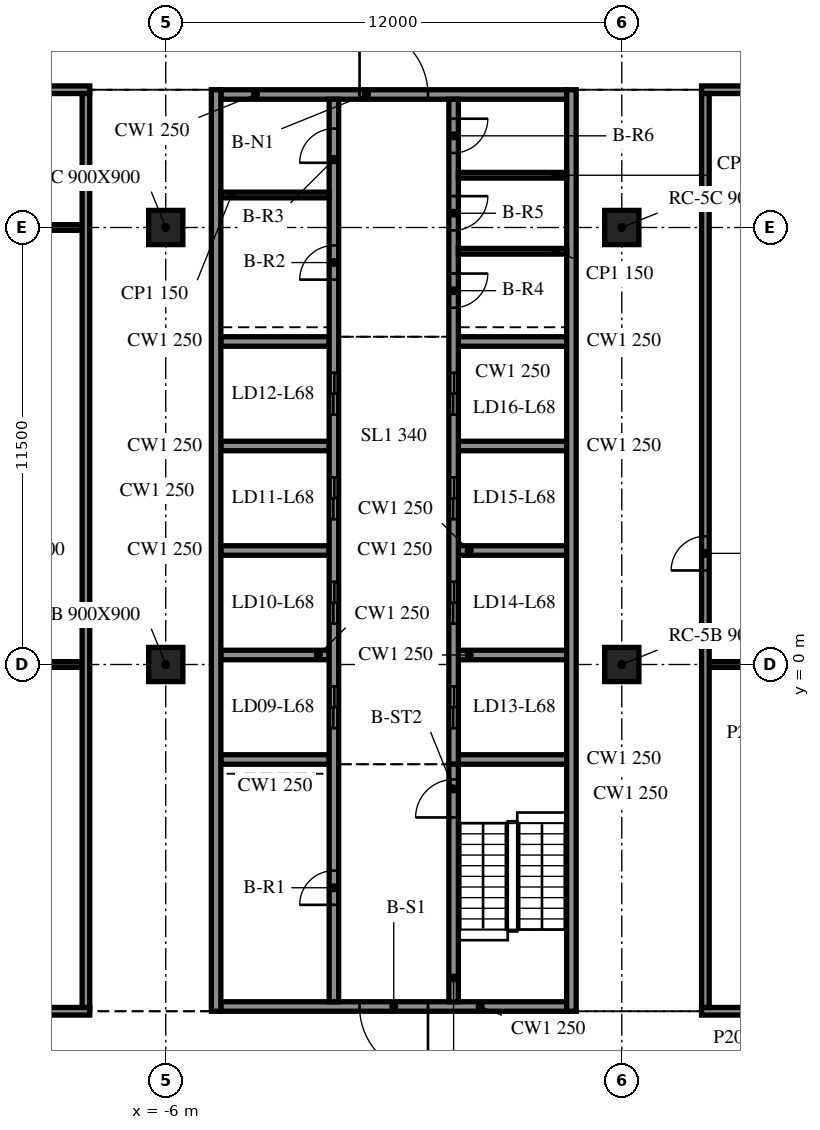
"""IFC4 building model, lengths in metres.
Left out: names, types, materials, properties, quantities, classifications, styles, units other than length and angle.
Written with IfcOpenShell. Run it as: python <this file> out.ifc"""

import sys

from ifc_helpers import new_model, si_unit, direction, frame, frame_2d, origin, origin_2d, place, context, subcontext, project, spatial, rectangle, extrude, element, fill, save


model = new_model("IFC4")
c1 = context("Model", 3, precision=1e-05, world=origin(), true_north=direction((0.0, 1.0)))
c2 = subcontext(c1, "Body", "Model", "MODEL_VIEW")
j1 = project(units=[si_unit("LENGTHUNIT", "METRE"), si_unit("PLANEANGLEUNIT", "RADIAN")], contexts=[c1])
p1 = place(None, origin())
s1 = spatial("IfcSite", under=j1, at=p1, CompositionType="ELEMENT")
p2 = place(p1, origin())
s2 = spatial("IfcBuilding", under=s1, at=p2, CompositionType="ELEMENT")
p3 = place(p2, frame((0.0, 0.0, 278.5)))
s3 = spatial("IfcBuildingStorey", under=s2, at=p3, CompositionType="ELEMENT", Elevation=278.5)
for number, where, z_axis, x_axis in (
    (1, (-6.0, 0.0, -0.34), (0.0, 0.0, 1.0), (1.0, 0.0, 0.0)),
    (2, (-6.0, 11.5, -0.34), (0.0, 0.0, 1.0), (1.0, 0.0, 0.0)),
    (3, (6.0, 0.0, -0.34), (0.0, 0.0, 1.0), (1.0, 0.0, 0.0)),
    (4, (6.0, 11.5, -0.34), (0.0, 0.0, 1.0), (1.0, 0.0, 0.0)),
):
    element("IfcColumn", number, at=place(p3, frame(where, z_axis=z_axis, x_axis=x_axis)), inside=s3, PredefinedType="COLUMN", context=c2, shape_type="SweptSolid", body=[
        extrude(rectangle(XDim=0.9, YDim=0.9, at=origin_2d()), origin(), (0.0, 0.0, 1.0), 3.8),
    ])
for number, where, z_axis, x_axis in (
    (5, (-4.675, 15.125, 0.0), (0.0, 0.0, 1.0), (0.0, -1.0, 0.0)),
    (6, (4.675, -9.125, 0.0), (0.0, 0.0, 1.0), (0.0, 1.0, 0.0)),
):
    element("IfcWall", number, at=place(p3, frame(where, z_axis=z_axis, x_axis=x_axis)), inside=s3, PredefinedType="SOLIDWALL", context=c2, shape_type="SweptSolid", body=[
        extrude(rectangle(XDim=24.25, YDim=0.25, at=frame_2d((12.125, 0.0))), origin(), (0.0, 0.0, 1.0), 3.46),
    ])
p4 = place(p3, frame((4.55, -9.0, 0.0), z_axis=(0.0, 0.0, 1.0), x_axis=(-1.0, 0.0, 0.0)))
e7 = element("IfcWall", 7, at=p4, inside=s3, PredefinedType="SOLIDWALL", context=c2, shape_type="SweptSolid", body=[
    extrude(rectangle(XDim=9.1, YDim=0.25, at=frame_2d((4.55, 0.0))), origin(), (0.0, 0.0, 1.0), 3.46),
])
p5 = place(p4, frame((3.65, 0.0, 0.0)))
e8 = element("IfcOpeningElement", 8, at=p5, cuts=e7, PredefinedType="OPENING", context=c2, shape_type="SweptSolid", body=[
    extrude(rectangle(XDim=1.8, YDim=2.1, at=frame_2d((0.9, 1.05))), frame((0.0, 0.135, 0.0), z_axis=(0.0, -1.0, 0.0), x_axis=(1.0, 0.0, 0.0)), (0.0, 0.0, 1.0), 0.27),
])
p6 = place(p3, frame((-4.55, 15.0, 0.0), z_axis=(0.0, 0.0, 1.0), x_axis=(1.0, 0.0, 0.0)))
e9 = element("IfcWall", 9, at=p6, inside=s3, PredefinedType="SOLIDWALL", context=c2, shape_type="SweptSolid", body=[
    extrude(rectangle(XDim=9.1, YDim=0.25, at=frame_2d((4.55, 0.0))), origin(), (0.0, 0.0, 1.0), 3.46),
])
p7 = place(p6, frame((3.65, 0.0, 0.0)))
e10 = element("IfcOpeningElement", 10, at=p7, cuts=e9, PredefinedType="OPENING", context=c2, shape_type="SweptSolid", body=[
    extrude(rectangle(XDim=1.8, YDim=2.1, at=frame_2d((0.9, 1.05))), frame((0.0, 0.135, 0.0), z_axis=(0.0, -1.0, 0.0), x_axis=(1.0, 0.0, 0.0)), (0.0, 0.0, 1.0), 0.27),
])
p8 = place(p3, frame((-1.575, -8.875, 0.0), z_axis=(0.0, 0.0, 1.0), x_axis=(0.0, 1.0, 0.0)))
e11 = element("IfcWall", 11, at=p8, inside=s3, PredefinedType="SOLIDWALL", context=c2, shape_type="SweptSolid", body=[
    extrude(rectangle(XDim=23.75, YDim=0.25, at=frame_2d((11.875, 0.0))), origin(), (0.0, 0.0, 1.0), 3.46),
])
p9 = place(p8, frame((7.2, 0.0, 0.0)))
e12 = element("IfcOpeningElement", 12, at=p9, cuts=e11, PredefinedType="OPENING", context=c2, shape_type="SweptSolid", body=[
    extrude(rectangle(XDim=1.1, YDim=2.1, at=frame_2d((0.55, 1.05))), frame((0.0, 0.135, 0.0), z_axis=(0.0, -1.0, 0.0), x_axis=(1.0, 0.0, 0.0)), (0.0, 0.0, 1.0), 0.27),
])
p10 = place(p8, frame((9.95, 0.0, 0.0)))
e13 = element("IfcOpeningElement", 13, at=p10, cuts=e11, PredefinedType="OPENING", context=c2, shape_type="SweptSolid", body=[
    extrude(rectangle(XDim=1.1, YDim=2.1, at=frame_2d((0.55, 1.05))), frame((0.0, 0.135, 0.0), z_axis=(0.0, -1.0, 0.0), x_axis=(1.0, 0.0, 0.0)), (0.0, 0.0, 1.0), 0.27),
])
p11 = place(p8, frame((12.7, 0.0, 0.0)))
e14 = element("IfcOpeningElement", 14, at=p11, cuts=e11, PredefinedType="OPENING", context=c2, shape_type="SweptSolid", body=[
    extrude(rectangle(XDim=1.1, YDim=2.1, at=frame_2d((0.55, 1.05))), frame((0.0, 0.135, 0.0), z_axis=(0.0, -1.0, 0.0), x_axis=(1.0, 0.0, 0.0)), (0.0, 0.0, 1.0), 0.27),
])
p12 = place(p8, frame((15.45, 0.0, 0.0)))
e15 = element("IfcOpeningElement", 15, at=p12, cuts=e11, PredefinedType="OPENING", context=c2, shape_type="SweptSolid", body=[
    extrude(rectangle(XDim=1.1, YDim=2.1, at=frame_2d((0.55, 1.05))), frame((0.0, 0.135, 0.0), z_axis=(0.0, -1.0, 0.0), x_axis=(1.0, 0.0, 0.0)), (0.0, 0.0, 1.0), 0.27),
])
p13 = place(p8, frame((2.55, 0.0, 0.0)))
e16 = element("IfcOpeningElement", 16, at=p13, cuts=e11, PredefinedType="OPENING", context=c2, shape_type="SweptSolid", body=[
    extrude(rectangle(XDim=0.9, YDim=2.1, at=frame_2d((0.45, 1.05))), frame((0.0, 0.135, 0.0), z_axis=(0.0, -1.0, 0.0), x_axis=(1.0, 0.0, 0.0)), (0.0, 0.0, 1.0), 0.27),
])
p14 = place(p8, frame((19.002, 0.0, 0.0)))
e17 = element("IfcOpeningElement", 17, at=p14, cuts=e11, PredefinedType="OPENING", context=c2, shape_type="SweptSolid", body=[
    extrude(rectangle(XDim=0.9, YDim=2.1, at=frame_2d((0.45, 1.05))), frame((0.0, 0.135, 0.0), z_axis=(0.0, -1.0, 0.0), x_axis=(1.0, 0.0, 0.0)), (0.0, 0.0, 1.0), 0.27),
])
p15 = place(p8, frame((22.077, 0.0, 0.0)))
e18 = element("IfcOpeningElement", 18, at=p15, cuts=e11, PredefinedType="OPENING", context=c2, shape_type="SweptSolid", body=[
    extrude(rectangle(XDim=0.9, YDim=2.1, at=frame_2d((0.45, 1.05))), frame((0.0, 0.135, 0.0), z_axis=(0.0, -1.0, 0.0), x_axis=(1.0, 0.0, 0.0)), (0.0, 0.0, 1.0), 0.27),
])
p16 = place(p3, frame((1.575, -8.875, 0.0), z_axis=(0.0, 0.0, 1.0), x_axis=(0.0, 1.0, 0.0)))
e19 = element("IfcWall", 19, at=p16, inside=s3, PredefinedType="SOLIDWALL", context=c2, shape_type="SweptSolid", body=[
    extrude(rectangle(XDim=6.25, YDim=0.25, at=frame_2d((3.125, 0.0))), origin(), (0.0, 0.0, 1.0), 3.46),
])
p17 = place(p16, frame((4.85, 0.0, 0.0)))
e20 = element("IfcOpeningElement", 20, at=p17, cuts=e19, PredefinedType="OPENING", context=c2, shape_type="SweptSolid", body=[
    extrude(rectangle(XDim=1.0, YDim=2.1, at=frame_2d((0.5, 1.05))), frame((0.0, 0.135, 0.0), z_axis=(0.0, -1.0, 0.0), x_axis=(1.0, 0.0, 0.0)), (0.0, 0.0, 1.0), 0.27),
])
p18 = place(p3, frame((1.575, 14.875, 0.0), z_axis=(0.0, 0.0, 1.0), x_axis=(0.0, -1.0, 0.0)))
e21 = element("IfcWall", 21, at=p18, inside=s3, PredefinedType="SOLIDWALL", context=c2, shape_type="SweptSolid", body=[
    extrude(rectangle(XDim=17.5, YDim=0.25, at=frame_2d((8.75, 0.0))), origin(), (0.0, 0.0, 1.0), 3.46),
])
p19 = place(p18, frame((15.45, 0.0, 0.0)))
e22 = element("IfcOpeningElement", 22, at=p19, cuts=e21, PredefinedType="OPENING", context=c2, shape_type="SweptSolid", body=[
    extrude(rectangle(XDim=1.1, YDim=2.1, at=frame_2d((0.55, 1.05))), frame((0.0, 0.135, 0.0), z_axis=(0.0, -1.0, 0.0), x_axis=(1.0, 0.0, 0.0)), (0.0, 0.0, 1.0), 0.27),
])
p20 = place(p18, frame((12.7, 0.0, 0.0)))
e23 = element("IfcOpeningElement", 23, at=p20, cuts=e21, PredefinedType="OPENING", context=c2, shape_type="SweptSolid", body=[
    extrude(rectangle(XDim=1.1, YDim=2.1, at=frame_2d((0.55, 1.05))), frame((0.0, 0.135, 0.0), z_axis=(0.0, -1.0, 0.0), x_axis=(1.0, 0.0, 0.0)), (0.0, 0.0, 1.0), 0.27),
])
p21 = place(p18, frame((9.95, 0.0, 0.0)))
e24 = element("IfcOpeningElement", 24, at=p21, cuts=e21, PredefinedType="OPENING", context=c2, shape_type="SweptSolid", body=[
    extrude(rectangle(XDim=1.1, YDim=2.1, at=frame_2d((0.55, 1.05))), frame((0.0, 0.135, 0.0), z_axis=(0.0, -1.0, 0.0), x_axis=(1.0, 0.0, 0.0)), (0.0, 0.0, 1.0), 0.27),
])
p22 = place(p18, frame((7.2, 0.0, 0.0)))
e25 = element("IfcOpeningElement", 25, at=p22, cuts=e21, PredefinedType="OPENING", context=c2, shape_type="SweptSolid", body=[
    extrude(rectangle(XDim=1.1, YDim=2.1, at=frame_2d((0.55, 1.05))), frame((0.0, 0.135, 0.0), z_axis=(0.0, -1.0, 0.0), x_axis=(1.0, 0.0, 0.0)), (0.0, 0.0, 1.0), 0.27),
])
p23 = place(p18, frame((4.587, 0.0, 0.0)))
e26 = element("IfcOpeningElement", 26, at=p23, cuts=e21, PredefinedType="OPENING", context=c2, shape_type="SweptSolid", body=[
    extrude(rectangle(XDim=0.9, YDim=2.1, at=frame_2d((0.45, 1.05))), frame((0.0, 0.135, 0.0), z_axis=(0.0, -1.0, 0.0), x_axis=(1.0, 0.0, 0.0)), (0.0, 0.0, 1.0), 0.27),
])
p24 = place(p18, frame((2.55, 0.0, 0.0)))
e27 = element("IfcOpeningElement", 27, at=p24, cuts=e21, PredefinedType="OPENING", context=c2, shape_type="SweptSolid", body=[
    extrude(rectangle(XDim=0.9, YDim=2.1, at=frame_2d((0.45, 1.05))), frame((0.0, 0.135, 0.0), z_axis=(0.0, -1.0, 0.0), x_axis=(1.0, 0.0, 0.0)), (0.0, 0.0, 1.0), 0.27),
])
p25 = place(p18, frame((0.512, 0.0, 0.0)))
e28 = element("IfcOpeningElement", 28, at=p25, cuts=e21, PredefinedType="OPENING", context=c2, shape_type="SweptSolid", body=[
    extrude(rectangle(XDim=0.9, YDim=2.1, at=frame_2d((0.45, 1.05))), frame((0.0, 0.135, 0.0), z_axis=(0.0, -1.0, 0.0), x_axis=(1.0, 0.0, 0.0)), (0.0, 0.0, 1.0), 0.27),
])
for number, where, z_axis, x_axis in (
    (29, (-4.55, -2.5, 0.0), (0.0, 0.0, 1.0), (1.0, 0.0, 0.0)),
    (30, (-4.55, 0.25, 0.0), (0.0, 0.0, 1.0), (1.0, 0.0, 0.0)),
    (31, (-4.55, 3.0, 0.0), (0.0, 0.0, 1.0), (1.0, 0.0, 0.0)),
    (32, (-4.55, 5.75, 0.0), (0.0, 0.0, 1.0), (1.0, 0.0, 0.0)),
    (33, (-4.55, 8.5, 0.0), (0.0, 0.0, 1.0), (1.0, 0.0, 0.0)),
    (34, (1.7, -2.5, 0.0), (0.0, 0.0, 1.0), (1.0, 0.0, 0.0)),
    (35, (1.7, 0.25, 0.0), (0.0, 0.0, 1.0), (1.0, 0.0, 0.0)),
    (36, (1.7, 3.0, 0.0), (0.0, 0.0, 1.0), (1.0, 0.0, 0.0)),
    (37, (1.7, 5.75, 0.0), (0.0, 0.0, 1.0), (1.0, 0.0, 0.0)),
    (38, (1.7, 8.5, 0.0), (0.0, 0.0, 1.0), (1.0, 0.0, 0.0)),
):
    element("IfcWall", number, at=place(p3, frame(where, z_axis=z_axis, x_axis=x_axis)), inside=s3, PredefinedType="SOLIDWALL", context=c2, shape_type="SweptSolid", body=[
        extrude(rectangle(XDim=2.85, YDim=0.25, at=frame_2d((1.425, 0.0))), origin(), (0.0, 0.0, 1.0), 3.46),
    ])
for number, where, z_axis, x_axis in (
    (39, (-4.55, 12.355, 0.0), (0.0, 0.0, 1.0), (1.0, 0.0, 0.0)),
    (40, (1.7, 10.875, 0.0), (0.0, 0.0, 1.0), (1.0, 0.0, 0.0)),
    (41, (1.7, 12.875, 0.0), (0.0, 0.0, 1.0), (1.0, 0.0, 0.0)),
):
    element("IfcWall", number, at=place(p3, frame(where, z_axis=z_axis, x_axis=x_axis)), inside=s3, PredefinedType="PARTITIONING", context=c2, shape_type="SweptSolid", body=[
        extrude(rectangle(XDim=2.85, YDim=0.15, at=frame_2d((1.425, 0.0))), origin(), (0.0, 0.0, 1.0), 3.46),
    ])
p26 = place(p3, frame((-16.1, -9.125, 0.0), z_axis=(0.0, 0.0, 1.0), x_axis=(1.0, 0.0, 0.0)))
e42 = element("IfcWall", 42, at=p26, inside=s3, PredefinedType="PARTITIONING", context=c2, shape_type="SweptSolid", body=[
    extrude(rectangle(XDim=8.1, YDim=0.2, at=frame_2d((4.05, 0.0))), origin(), (0.0, 0.0, 1.0), 3.46),
])
p27 = place(p26, frame((3.5, 0.0, 0.0)))
e43 = element("IfcOpeningElement", 43, at=p27, cuts=e42, PredefinedType="OPENING", context=c2, shape_type="SweptSolid", body=[
    extrude(rectangle(XDim=0.9, YDim=2.1, at=frame_2d((0.45, 1.05))), frame((0.0, 0.11, 0.0), z_axis=(0.0, -1.0, 0.0), x_axis=(1.0, 0.0, 0.0)), (0.0, 0.0, 1.0), 0.22),
])
p28 = place(p3, frame((8.1, -9.125, 0.0), z_axis=(0.0, 0.0, 1.0), x_axis=(1.0, 0.0, 0.0)))
e44 = element("IfcWall", 44, at=p28, inside=s3, PredefinedType="PARTITIONING", context=c2, shape_type="SweptSolid", body=[
    extrude(rectangle(XDim=7.7, YDim=0.2, at=frame_2d((3.85, 0.0))), origin(), (0.0, 0.0, 1.0), 3.46),
])
p29 = place(p28, frame((3.3, 0.0, 0.0)))
e45 = element("IfcOpeningElement", 45, at=p29, cuts=e44, PredefinedType="OPENING", context=c2, shape_type="SweptSolid", body=[
    extrude(rectangle(XDim=0.9, YDim=2.1, at=frame_2d((0.45, 1.05))), frame((0.0, 0.11, 0.0), z_axis=(0.0, -1.0, 0.0), x_axis=(1.0, 0.0, 0.0)), (0.0, 0.0, 1.0), 0.22),
])
p30 = place(p3, frame((-15.9, 0.0, 0.0), z_axis=(0.0, 0.0, 1.0), x_axis=(1.0, 0.0, 0.0)))
e46 = element("IfcWall", 46, at=p30, inside=s3, PredefinedType="PARTITIONING", context=c2, shape_type="SweptSolid", body=[
    extrude(rectangle(XDim=7.7, YDim=0.15, at=frame_2d((3.85, 0.0))), origin(), (0.0, 0.0, 1.0), 3.46),
])
p31 = place(p3, frame((8.3, 0.0, 0.0), z_axis=(0.0, 0.0, 1.0), x_axis=(1.0, 0.0, 0.0)))
e47 = element("IfcWall", 47, at=p31, inside=s3, PredefinedType="PARTITIONING", context=c2, shape_type="SweptSolid", body=[
    extrude(rectangle(XDim=7.3, YDim=0.15, at=frame_2d((3.65, 0.0))), origin(), (0.0, 0.0, 1.0), 3.46),
])
p32 = place(p3, frame((-15.9, 11.5, 0.0), z_axis=(0.0, 0.0, 1.0), x_axis=(1.0, 0.0, 0.0)))
e48 = element("IfcWall", 48, at=p32, inside=s3, PredefinedType="PARTITIONING", context=c2, shape_type="SweptSolid", body=[
    extrude(rectangle(XDim=7.7, YDim=0.15, at=frame_2d((3.85, 0.0))), origin(), (0.0, 0.0, 1.0), 3.46),
])
p33 = place(p3, frame((-16.1, 15.125, 0.0), z_axis=(0.0, 0.0, 1.0), x_axis=(1.0, 0.0, 0.0)))
e49 = element("IfcWall", 49, at=p33, inside=s3, PredefinedType="PARTITIONING", context=c2, shape_type="SweptSolid", body=[
    extrude(rectangle(XDim=8.1, YDim=0.2, at=frame_2d((4.05, 0.0))), origin(), (0.0, 0.0, 1.0), 3.46),
])
p34 = place(p33, frame((3.5, 0.0, 0.0)))
e50 = element("IfcOpeningElement", 50, at=p34, cuts=e49, PredefinedType="OPENING", context=c2, shape_type="SweptSolid", body=[
    extrude(rectangle(XDim=1.0, YDim=2.1, at=frame_2d((0.5, 1.05))), frame((0.0, 0.11, 0.0), z_axis=(0.0, -1.0, 0.0), x_axis=(1.0, 0.0, 0.0)), (0.0, 0.0, 1.0), 0.22),
])
p35 = place(p3, frame((8.1, 15.125, 0.0), z_axis=(0.0, 0.0, 1.0), x_axis=(1.0, 0.0, 0.0)))
e51 = element("IfcWall", 51, at=p35, inside=s3, PredefinedType="PARTITIONING", context=c2, shape_type="SweptSolid", body=[
    extrude(rectangle(XDim=7.7, YDim=0.2, at=frame_2d((3.85, 0.0))), origin(), (0.0, 0.0, 1.0), 3.46),
])
p36 = place(p3, frame((-8.1, -9.025, 0.0), z_axis=(0.0, 0.0, 1.0), x_axis=(0.0, 1.0, 0.0)))
e52 = element("IfcWall", 52, at=p36, inside=s3, PredefinedType="PARTITIONING", context=c2, shape_type="SweptSolid", body=[
    extrude(rectangle(XDim=24.05, YDim=0.2, at=frame_2d((12.025, 0.0))), origin(), (0.0, 0.0, 1.0), 3.46),
])
p37 = place(p3, frame((8.2, -9.025, 0.0), z_axis=(0.0, 0.0, 1.0), x_axis=(0.0, 1.0, 0.0)))
e53 = element("IfcWall", 53, at=p37, inside=s3, PredefinedType="PARTITIONING", context=c2, shape_type="SweptSolid", body=[
    extrude(rectangle(XDim=24.05, YDim=0.2, at=frame_2d((12.025, 0.0))), origin(), (0.0, 0.0, 1.0), 3.46),
])
p38 = place(p37, frame((11.5, 0.0, 0.0)))
e54 = element("IfcOpeningElement", 54, at=p38, cuts=e53, PredefinedType="OPENING", context=c2, shape_type="SweptSolid", body=[
    extrude(rectangle(XDim=0.9, YDim=2.1, at=frame_2d((0.45, 1.05))), frame((0.0, 0.11, 0.0), z_axis=(0.0, -1.0, 0.0), x_axis=(1.0, 0.0, 0.0)), (0.0, 0.0, 1.0), 0.22),
])
p39 = place(p5, origin())
e55 = element("IfcDoor", 55, at=p39, inside=s3, OperationType="DOUBLE_DOOR_SINGLE_SWING", PredefinedType="DOOR", context=c2, shape_type="SweptSolid", body=[
    extrude(rectangle(XDim=1.8, YDim=2.1, at=frame_2d((0.9, 1.05))), frame((0.0, 0.025, 0.0), z_axis=(0.0, -1.0, 0.0), x_axis=(1.0, 0.0, 0.0)), (0.0, 0.0, 1.0), 0.05),
])
fill(e8, e55)
p40 = place(p7, origin())
e56 = element("IfcDoor", 56, at=p40, inside=s3, OperationType="DOUBLE_DOOR_SINGLE_SWING", PredefinedType="DOOR", context=c2, shape_type="SweptSolid", body=[
    extrude(rectangle(XDim=1.8, YDim=2.1, at=frame_2d((0.9, 1.05))), frame((0.0, 0.025, 0.0), z_axis=(0.0, -1.0, 0.0), x_axis=(1.0, 0.0, 0.0)), (0.0, 0.0, 1.0), 0.05),
])
fill(e10, e56)
p41 = place(p19, origin())
e57 = element("IfcDoor", 57, at=p41, inside=s3, OperationType="DOUBLE_DOOR_SLIDING", PredefinedType="DOOR", context=c2, shape_type="SweptSolid", body=[
    extrude(rectangle(XDim=1.1, YDim=2.1, at=frame_2d((0.55, 1.05))), frame((0.0, 0.025, 0.0), z_axis=(0.0, -1.0, 0.0), x_axis=(1.0, 0.0, 0.0)), (0.0, 0.0, 1.0), 0.05),
])
fill(e22, e57)
p42 = place(p20, origin())
e58 = element("IfcDoor", 58, at=p42, inside=s3, OperationType="DOUBLE_DOOR_SLIDING", PredefinedType="DOOR", context=c2, shape_type="SweptSolid", body=[
    extrude(rectangle(XDim=1.1, YDim=2.1, at=frame_2d((0.55, 1.05))), frame((0.0, 0.025, 0.0), z_axis=(0.0, -1.0, 0.0), x_axis=(1.0, 0.0, 0.0)), (0.0, 0.0, 1.0), 0.05),
])
fill(e23, e58)
p43 = place(p21, origin())
e59 = element("IfcDoor", 59, at=p43, inside=s3, OperationType="DOUBLE_DOOR_SLIDING", PredefinedType="DOOR", context=c2, shape_type="SweptSolid", body=[
    extrude(rectangle(XDim=1.1, YDim=2.1, at=frame_2d((0.55, 1.05))), frame((0.0, 0.025, 0.0), z_axis=(0.0, -1.0, 0.0), x_axis=(1.0, 0.0, 0.0)), (0.0, 0.0, 1.0), 0.05),
])
fill(e24, e59)
p44 = place(p22, origin())
e60 = element("IfcDoor", 60, at=p44, inside=s3, OperationType="DOUBLE_DOOR_SLIDING", PredefinedType="DOOR", context=c2, shape_type="SweptSolid", body=[
    extrude(rectangle(XDim=1.1, YDim=2.1, at=frame_2d((0.55, 1.05))), frame((0.0, 0.025, 0.0), z_axis=(0.0, -1.0, 0.0), x_axis=(1.0, 0.0, 0.0)), (0.0, 0.0, 1.0), 0.05),
])
fill(e25, e60)
p45 = place(p9, origin())
e61 = element("IfcDoor", 61, at=p45, inside=s3, OperationType="DOUBLE_DOOR_SLIDING", PredefinedType="DOOR", context=c2, shape_type="SweptSolid", body=[
    extrude(rectangle(XDim=1.1, YDim=2.1, at=frame_2d((0.55, 1.05))), frame((0.0, 0.025, 0.0), z_axis=(0.0, -1.0, 0.0), x_axis=(1.0, 0.0, 0.0)), (0.0, 0.0, 1.0), 0.05),
])
fill(e12, e61)
p46 = place(p10, origin())
e62 = element("IfcDoor", 62, at=p46, inside=s3, OperationType="DOUBLE_DOOR_SLIDING", PredefinedType="DOOR", context=c2, shape_type="SweptSolid", body=[
    extrude(rectangle(XDim=1.1, YDim=2.1, at=frame_2d((0.55, 1.05))), frame((0.0, 0.025, 0.0), z_axis=(0.0, -1.0, 0.0), x_axis=(1.0, 0.0, 0.0)), (0.0, 0.0, 1.0), 0.05),
])
fill(e13, e62)
p47 = place(p11, origin())
e63 = element("IfcDoor", 63, at=p47, inside=s3, OperationType="DOUBLE_DOOR_SLIDING", PredefinedType="DOOR", context=c2, shape_type="SweptSolid", body=[
    extrude(rectangle(XDim=1.1, YDim=2.1, at=frame_2d((0.55, 1.05))), frame((0.0, 0.025, 0.0), z_axis=(0.0, -1.0, 0.0), x_axis=(1.0, 0.0, 0.0)), (0.0, 0.0, 1.0), 0.05),
])
fill(e14, e63)
p48 = place(p12, origin())
e64 = element("IfcDoor", 64, at=p48, inside=s3, OperationType="DOUBLE_DOOR_SLIDING", PredefinedType="DOOR", context=c2, shape_type="SweptSolid", body=[
    extrude(rectangle(XDim=1.1, YDim=2.1, at=frame_2d((0.55, 1.05))), frame((0.0, 0.025, 0.0), z_axis=(0.0, -1.0, 0.0), x_axis=(1.0, 0.0, 0.0)), (0.0, 0.0, 1.0), 0.05),
])
fill(e15, e64)
p49 = place(p13, origin())
e65 = element("IfcDoor", 65, at=p49, inside=s3, OperationType="SINGLE_SWING_LEFT", PredefinedType="DOOR", context=c2, shape_type="SweptSolid", body=[
    extrude(rectangle(XDim=0.9, YDim=2.1, at=frame_2d((0.45, 1.05))), frame((0.0, 0.025, 0.0), z_axis=(0.0, -1.0, 0.0), x_axis=(1.0, 0.0, 0.0)), (0.0, 0.0, 1.0), 0.05),
])
fill(e16, e65)
p50 = place(p14, origin())
e66 = element("IfcDoor", 66, at=p50, inside=s3, OperationType="SINGLE_SWING_RIGHT", PredefinedType="DOOR", context=c2, shape_type="SweptSolid", body=[
    extrude(rectangle(XDim=0.9, YDim=2.1, at=frame_2d((0.45, 1.05))), frame((0.0, 0.025, 0.0), z_axis=(0.0, -1.0, 0.0), x_axis=(1.0, 0.0, 0.0)), (0.0, 0.0, 1.0), 0.05),
])
fill(e17, e66)
p51 = place(p15, origin())
e67 = element("IfcDoor", 67, at=p51, inside=s3, OperationType="SINGLE_SWING_LEFT", PredefinedType="DOOR", context=c2, shape_type="SweptSolid", body=[
    extrude(rectangle(XDim=0.9, YDim=2.1, at=frame_2d((0.45, 1.05))), frame((0.0, 0.025, 0.0), z_axis=(0.0, -1.0, 0.0), x_axis=(1.0, 0.0, 0.0)), (0.0, 0.0, 1.0), 0.05),
])
fill(e18, e67)
p52 = place(p23, origin())
e68 = element("IfcDoor", 68, at=p52, inside=s3, OperationType="SINGLE_SWING_RIGHT", PredefinedType="DOOR", context=c2, shape_type="SweptSolid", body=[
    extrude(rectangle(XDim=0.9, YDim=2.1, at=frame_2d((0.45, 1.05))), frame((0.0, 0.025, 0.0), z_axis=(0.0, -1.0, 0.0), x_axis=(1.0, 0.0, 0.0)), (0.0, 0.0, 1.0), 0.05),
])
fill(e26, e68)
p53 = place(p24, origin())
e69 = element("IfcDoor", 69, at=p53, inside=s3, OperationType="SINGLE_SWING_LEFT", PredefinedType="DOOR", context=c2, shape_type="SweptSolid", body=[
    extrude(rectangle(XDim=0.9, YDim=2.1, at=frame_2d((0.45, 1.05))), frame((0.0, 0.025, 0.0), z_axis=(0.0, -1.0, 0.0), x_axis=(1.0, 0.0, 0.0)), (0.0, 0.0, 1.0), 0.05),
])
fill(e27, e69)
p54 = place(p25, origin())
e70 = element("IfcDoor", 70, at=p54, inside=s3, OperationType="SINGLE_SWING_RIGHT", PredefinedType="DOOR", context=c2, shape_type="SweptSolid", body=[
    extrude(rectangle(XDim=0.9, YDim=2.1, at=frame_2d((0.45, 1.05))), frame((0.0, 0.025, 0.0), z_axis=(0.0, -1.0, 0.0), x_axis=(1.0, 0.0, 0.0)), (0.0, 0.0, 1.0), 0.05),
])
fill(e28, e70)
p55 = place(p17, origin())
e71 = element("IfcDoor", 71, at=p55, inside=s3, OperationType="SINGLE_SWING_LEFT", PredefinedType="DOOR", context=c2, shape_type="SweptSolid", body=[
    extrude(rectangle(XDim=1.0, YDim=2.1, at=frame_2d((0.5, 1.05))), frame((0.0, 0.025, 0.0), z_axis=(0.0, -1.0, 0.0), x_axis=(1.0, 0.0, 0.0)), (0.0, 0.0, 1.0), 0.05),
])
fill(e20, e71)
p56 = place(p38, origin())
e72 = element("IfcDoor", 72, at=p56, inside=s3, OperationType="SINGLE_SWING_RIGHT", PredefinedType="DOOR", context=c2, shape_type="SweptSolid", body=[
    extrude(rectangle(XDim=0.9, YDim=2.1, at=frame_2d((0.45, 1.05))), frame((0.0, 0.025, 0.0), z_axis=(0.0, -1.0, 0.0), x_axis=(1.0, 0.0, 0.0)), (0.0, 0.0, 1.0), 0.05),
])
fill(e54, e72)
save(model, sys.argv[1])
